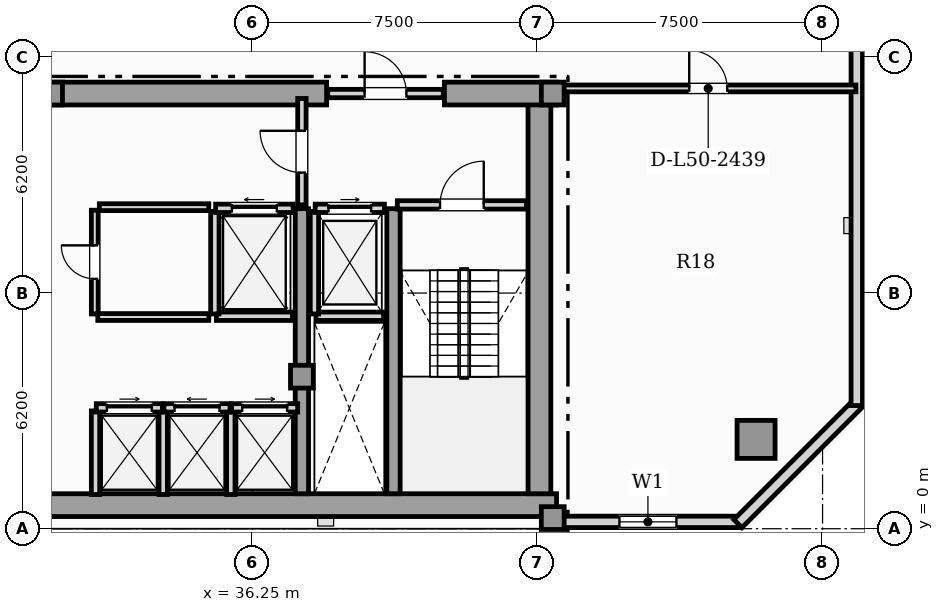
"""IFC4 building model, lengths in metres.
Left out: names, types, materials, properties, quantities, classifications, styles, units other than length and angle.
Written with IfcOpenShell. Run it as: python <this file> out.ifc"""

import sys

from ifc_helpers import new_model, si_unit, direction, frame, frame_2d, origin, origin_2d, place, context, subcontext, project, spatial, rectangle, hollow_rectangle, extrude, element, fill, save


model = new_model("IFC4")
c1 = context("Model", 3, precision=1e-05, world=origin(), true_north=direction((0.0, 1.0)))
c2 = subcontext(c1, "Body", "Model", "MODEL_VIEW")
j1 = project(units=[si_unit("LENGTHUNIT", "METRE"), si_unit("PLANEANGLEUNIT", "RADIAN")], contexts=[c1])
p1 = place(None, origin())
s1 = spatial("IfcSite", under=j1, at=p1, CompositionType="ELEMENT")
p2 = place(p1, origin())
s2 = spatial("IfcBuilding", under=s1, at=p2, CompositionType="ELEMENT")
p3 = place(p2, frame((0.0, 0.0, 204.15)))
s3 = spatial("IfcBuildingStorey", under=s2, at=p3, CompositionType="ELEMENT", Elevation=204.15)
p4 = place(p3, frame((13.25, 0.62, 0.0), z_axis=(0.0, 0.0, 1.0), x_axis=(1.0, 0.0, 0.0)))
e1 = element("IfcWall", 1, at=p4, inside=s3, PredefinedType="SHEAR", context=c2, shape_type="SweptSolid", body=[
    extrude(rectangle(XDim=31.0, YDim=0.6, at=frame_2d((15.5, 0.0))), origin(), (0.0, 0.0, 1.0), 3.63),
])
p5 = place(p3, frame((43.8, 0.92, 0.0), z_axis=(0.0, 0.0, 1.0), x_axis=(0.0, 1.0, 0.0)))
e2 = element("IfcWall", 2, at=p5, inside=s3, PredefinedType="SHEAR", context=c2, shape_type="SweptSolid", body=[
    extrude(rectangle(XDim=10.53, YDim=0.6, at=frame_2d((5.265, 0.0))), origin(), (0.0, 0.0, 1.0), 3.63),
])
p6 = place(p3, frame((30.9, 11.45, 0.0), z_axis=(0.0, 0.0, 1.0), x_axis=(1.0, 0.0, 0.0)))
e3 = element("IfcWall", 3, at=p6, inside=s3, PredefinedType="SHEAR", context=c2, shape_type="SweptSolid", body=[
    extrude(rectangle(XDim=7.3, YDim=0.6, at=frame_2d((3.65, 0.0))), origin(), (0.0, 0.0, 1.0), 3.63),
])
p7 = place(p3, frame((41.3, 11.45, 0.0), z_axis=(0.0, 0.0, 1.0), x_axis=(1.0, 0.0, 0.0)))
e4 = element("IfcWall", 4, at=p7, inside=s3, PredefinedType="SHEAR", context=c2, shape_type="SweptSolid", body=[
    extrude(rectangle(XDim=2.95, YDim=0.6, at=frame_2d((1.475, 0.0))), origin(), (0.0, 0.0, 1.0), 3.63),
])
for number, where, z_axis, x_axis in (
    (5, (37.55, 0.92, 0.0), (0.0, 0.0, 1.0), (0.0, 1.0, 0.0)),
    (6, (39.96, 0.92, 0.0), (0.0, 0.0, 1.0), (0.0, 1.0, 0.0)),
):
    element("IfcWall", number, at=place(p3, frame(where, z_axis=z_axis, x_axis=x_axis)), inside=s3, PredefinedType="SHEAR", context=c2, shape_type="SweptSolid", body=[
        extrude(rectangle(XDim=7.5, YDim=0.35, at=frame_2d((3.75, 0.0))), origin(), (0.0, 0.0, 1.0), 3.63),
    ])
for number, where, z_axis, x_axis in (
    (7, (44.15, 0.28, 0.0), (0.0, 0.0, 1.0), (1.0, 0.0, 0.0)),
    (8, (44.15, 11.45, 0.0), (0.0, 0.0, 1.0), (1.0, 0.0, 0.0)),
    (9, (37.55, 4.0, 0.0), (0.0, 0.0, 1.0), (1.0, 0.0, 0.0)),
    (10, (30.95, 11.45, 0.0), (0.0, 0.0, 1.0), (1.0, 0.0, 0.0)),
):
    element("IfcColumn", number, at=place(p3, frame(where, z_axis=z_axis, x_axis=x_axis)), inside=s3, PredefinedType="COLUMN", context=c2, shape_type="SweptSolid", body=[
        extrude(rectangle(XDim=0.6, YDim=0.6, at=origin_2d()), origin(), (0.0, 0.0, 1.0), 3.85),
    ])
p8 = place(p3, frame((49.5, 2.35, 0.0), z_axis=(0.0, 0.0, 1.0), x_axis=(1.0, 0.0, 0.0)))
e11 = element("IfcColumn", 11, at=p8, inside=s3, PredefinedType="USERDEFINED", context=c2, shape_type="SweptSolid", body=[
    extrude(hollow_rectangle(XDim=1.0, YDim=1.0, WallThickness=0.06, at=origin_2d()), origin(), (0.0, 0.0, 1.0), 3.85),
])
p9 = place(p3, frame((44.25, 0.18, 0.0), z_axis=(0.0, 0.0, 1.0), x_axis=(1.0, 0.0, 0.0)))
e12 = element("IfcWall", 12, at=p9, inside=s3, PredefinedType="SOLIDWALL", context=c2, shape_type="SweptSolid", body=[
    extrude(rectangle(XDim=4.81, YDim=0.3, at=frame_2d((2.405, 0.0))), origin(), (0.0, 0.0, 1.0), 3.63),
])
p10 = place(p9, frame((1.655, 0.0, 0.9)))
e13 = element("IfcOpeningElement", 13, at=p10, cuts=e12, PredefinedType="OPENING", context=c2, shape_type="SweptSolid", body=[
    extrude(rectangle(XDim=1.5, YDim=1.95, at=frame_2d((0.75, 0.975))), frame((0.0, 0.16, 0.0), z_axis=(0.0, -1.0, 0.0), x_axis=(1.0, 0.0, 0.0)), (0.0, 0.0, 1.0), 0.32),
])
p11 = place(p3, frame((49.022, 0.135, 0.0), z_axis=(0.0, 0.0, 1.0), x_axis=(0.707106781187, 0.707106781187, 0.0)))
e14 = element("IfcWall", 14, at=p11, inside=s3, PredefinedType="SOLIDWALL", context=c2, shape_type="SweptSolid", body=[
    extrude(rectangle(XDim=4.445, YDim=0.3, at=frame_2d((2.223, 0.0))), origin(), (0.0, 0.0, 1.0), 3.63),
])
p12 = place(p3, frame((52.15, 3.24, 0.0), z_axis=(0.0, 0.0, 1.0), x_axis=(0.0, 1.0, 0.0)))
e15 = element("IfcWall", 15, at=p12, inside=s3, PredefinedType="SOLIDWALL", context=c2, shape_type="SweptSolid", body=[
    extrude(rectangle(XDim=33.92, YDim=0.3, at=frame_2d((16.96, 0.0))), origin(), (0.0, 0.0, 1.0), 3.63),
])
p13 = place(p12, frame((30.56, 0.0, 0.95)))
e16 = element("IfcOpeningElement", 16, at=p13, cuts=e15, PredefinedType="OPENING", context=c2, shape_type="SweptSolid", body=[
    extrude(rectangle(XDim=0.9, YDim=1.5, at=frame_2d((0.45, 0.75))), frame((0.0, 0.16, 0.0), z_axis=(0.0, -1.0, 0.0), x_axis=(1.0, 0.0, 0.0)), (0.0, 0.0, 1.0), 0.32),
])
p14 = place(p12, frame((10.277, 0.0, 0.95)))
e17 = element("IfcOpeningElement", 17, at=p14, cuts=e15, PredefinedType="OPENING", context=c2, shape_type="SweptSolid", body=[
    extrude(rectangle(XDim=0.9, YDim=1.5, at=frame_2d((0.45, 0.75))), frame((0.0, 0.16, 0.0), z_axis=(0.0, -1.0, 0.0), x_axis=(1.0, 0.0, 0.0)), (0.0, 0.0, 1.0), 0.32),
])
p15 = place(p12, frame((12.971, 0.0, 0.9)))
e18 = element("IfcOpeningElement", 18, at=p15, cuts=e15, PredefinedType="OPENING", context=c2, shape_type="SweptSolid", body=[
    extrude(rectangle(XDim=1.5, YDim=1.95, at=frame_2d((0.75, 0.975))), frame((0.0, 0.16, 0.0), z_axis=(0.0, -1.0, 0.0), x_axis=(1.0, 0.0, 0.0)), (0.0, 0.0, 1.0), 0.32),
])
p16 = place(p12, frame((18.028, 0.0, 0.9)))
e19 = element("IfcOpeningElement", 19, at=p16, cuts=e15, PredefinedType="OPENING", context=c2, shape_type="SweptSolid", body=[
    extrude(rectangle(XDim=1.5, YDim=1.95, at=frame_2d((0.75, 0.975))), frame((0.0, 0.16, 0.0), z_axis=(0.0, -1.0, 0.0), x_axis=(1.0, 0.0, 0.0)), (0.0, 0.0, 1.0), 0.32),
])
p17 = place(p12, frame((25.274, 0.0, 0.9)))
e20 = element("IfcOpeningElement", 20, at=p17, cuts=e15, PredefinedType="OPENING", context=c2, shape_type="SweptSolid", body=[
    extrude(rectangle(XDim=1.5, YDim=1.95, at=frame_2d((0.75, 0.975))), frame((0.0, 0.16, 0.0), z_axis=(0.0, -1.0, 0.0), x_axis=(1.0, 0.0, 0.0)), (0.0, 0.0, 1.0), 0.32),
])
p18 = place(p12, frame((32.24, 0.0, 0.95)))
e21 = element("IfcOpeningElement", 21, at=p18, cuts=e15, PredefinedType="OPENING", context=c2, shape_type="SweptSolid", body=[
    extrude(rectangle(XDim=0.9, YDim=1.5, at=frame_2d((0.45, 0.75))), frame((0.0, 0.16, 0.0), z_axis=(0.0, -1.0, 0.0), x_axis=(1.0, 0.0, 0.0)), (0.0, 0.0, 1.0), 0.32),
])
p19 = place(p3, frame((37.92, 5.59, 0.0), z_axis=(0.0, 0.0, 1.0), x_axis=(1.0, 0.0, 0.0)))
e22 = element("IfcWall", 22, at=p19, inside=s3, PredefinedType="SOLIDWALL", context=c2, shape_type="SweptSolid", body=[
    extrude(rectangle(XDim=1.78, YDim=0.22, at=frame_2d((0.89, 0.0))), origin(), (0.0, 0.0, 1.0), 3.63),
])
p20 = place(p3, frame((37.88, 5.65, 0.0), z_axis=(0.0, 0.0, 1.0), x_axis=(0.0, 1.0, 0.0)))
e23 = element("IfcWall", 23, at=p20, inside=s3, PredefinedType="SOLIDWALL", context=c2, shape_type="SweptSolid", body=[
    extrude(rectangle(XDim=2.7, YDim=0.22, at=frame_2d((1.35, 0.0))), origin(), (0.0, 0.0, 1.0), 3.63),
])
p21 = place(p3, frame((37.9, 8.43, 0.0), z_axis=(0.0, 0.0, 1.0), x_axis=(1.0, 0.0, 0.0)))
e24 = element("IfcWall", 24, at=p21, inside=s3, PredefinedType="SOLIDWALL", context=c2, shape_type="SweptSolid", body=[
    extrude(rectangle(XDim=1.82, YDim=0.22, at=frame_2d((0.91, 0.0))), origin(), (0.0, 0.0, 1.0), 3.63),
])
p22 = place(p21, frame((0.35, 0.0, 0.0)))
e25 = element("IfcOpeningElement", 25, at=p22, cuts=e24, PredefinedType="OPENING", context=c2, shape_type="SweptSolid", body=[
    extrude(rectangle(XDim=1.12, YDim=2.25, at=frame_2d((0.56, 1.125))), frame((0.0, 0.12, 0.0), z_axis=(0.0, -1.0, 0.0), x_axis=(1.0, 0.0, 0.0)), (0.0, 0.0, 1.0), 0.24),
])
p23 = place(p3, frame((35.3, 5.59, 0.0), z_axis=(0.0, 0.0, 1.0), x_axis=(1.0, 0.0, 0.0)))
e26 = element("IfcWall", 26, at=p23, inside=s3, PredefinedType="SOLIDWALL", context=c2, shape_type="SweptSolid", body=[
    extrude(rectangle(XDim=2.0, YDim=0.22, at=frame_2d((1.0, 0.0))), origin(), (0.0, 0.0, 1.0), 3.63),
])
p24 = place(p3, frame((35.26, 5.65, 0.0), z_axis=(0.0, 0.0, 1.0), x_axis=(0.0, 1.0, 0.0)))
e27 = element("IfcWall", 27, at=p24, inside=s3, PredefinedType="SOLIDWALL", context=c2, shape_type="SweptSolid", body=[
    extrude(rectangle(XDim=2.7, YDim=0.22, at=frame_2d((1.35, 0.0))), origin(), (0.0, 0.0, 1.0), 3.63),
])
p25 = place(p3, frame((35.28, 8.43, 0.0), z_axis=(0.0, 0.0, 1.0), x_axis=(1.0, 0.0, 0.0)))
e28 = element("IfcWall", 28, at=p25, inside=s3, PredefinedType="SOLIDWALL", context=c2, shape_type="SweptSolid", body=[
    extrude(rectangle(XDim=2.04, YDim=0.22, at=frame_2d((1.02, 0.0))), origin(), (0.0, 0.0, 1.0), 3.63),
])
p26 = place(p25, frame((0.43, 0.0, 0.0)))
e29 = element("IfcOpeningElement", 29, at=p26, cuts=e28, PredefinedType="OPENING", context=c2, shape_type="SweptSolid", body=[
    extrude(rectangle(XDim=1.18, YDim=2.2, at=frame_2d((0.59, 1.1))), frame((0.0, 0.12, 0.0), z_axis=(0.0, -1.0, 0.0), x_axis=(1.0, 0.0, 0.0)), (0.0, 0.0, 1.0), 0.24),
])
for number, where, z_axis, x_axis in (
    (30, (32.12, 0.9, 0.0), (0.0, 0.0, 1.0), (0.0, 1.0, 0.0)),
    (31, (33.9, 0.9, 0.0), (0.0, 0.0, 1.0), (0.0, 1.0, 0.0)),
):
    element("IfcWall", number, at=place(p3, frame(where, z_axis=z_axis, x_axis=x_axis)), inside=s3, PredefinedType="SOLIDWALL", context=c2, shape_type="SweptSolid", body=[
        extrude(rectangle(XDim=2.2, YDim=0.22, at=frame_2d((1.1, 0.0))), origin(), (0.0, 0.0, 1.0), 3.63),
    ])
p27 = place(p3, frame((32.14, 3.18, 0.0), z_axis=(0.0, 0.0, 1.0), x_axis=(1.0, 0.0, 0.0)))
e32 = element("IfcWall", 32, at=p27, inside=s3, PredefinedType="SOLIDWALL", context=c2, shape_type="SweptSolid", body=[
    extrude(rectangle(XDim=1.74, YDim=0.22, at=frame_2d((0.87, 0.0))), origin(), (0.0, 0.0, 1.0), 3.63),
])
p28 = place(p27, frame((0.28, 0.0, 0.0)))
e33 = element("IfcOpeningElement", 33, at=p28, cuts=e32, PredefinedType="OPENING", context=c2, shape_type="SweptSolid", body=[
    extrude(rectangle(XDim=1.18, YDim=2.2, at=frame_2d((0.59, 1.1))), frame((0.0, 0.12, 0.0), z_axis=(0.0, -1.0, 0.0), x_axis=(1.0, 0.0, 0.0)), (0.0, 0.0, 1.0), 0.24),
])
p29 = place(p3, frame((35.68, 0.9, 0.0), z_axis=(0.0, 0.0, 1.0), x_axis=(0.0, 1.0, 0.0)))
e34 = element("IfcWall", 34, at=p29, inside=s3, PredefinedType="SOLIDWALL", context=c2, shape_type="SweptSolid", body=[
    extrude(rectangle(XDim=2.2, YDim=0.22, at=frame_2d((1.1, 0.0))), origin(), (0.0, 0.0, 1.0), 3.63),
])
p30 = place(p3, frame((33.92, 3.18, 0.0), z_axis=(0.0, 0.0, 1.0), x_axis=(1.0, 0.0, 0.0)))
e35 = element("IfcWall", 35, at=p30, inside=s3, PredefinedType="SOLIDWALL", context=c2, shape_type="SweptSolid", body=[
    extrude(rectangle(XDim=1.74, YDim=0.22, at=frame_2d((0.87, 0.0))), origin(), (0.0, 0.0, 1.0), 3.63),
])
p31 = place(p30, frame((0.28, 0.0, 0.0)))
e36 = element("IfcOpeningElement", 36, at=p31, cuts=e35, PredefinedType="OPENING", context=c2, shape_type="SweptSolid", body=[
    extrude(rectangle(XDim=1.18, YDim=2.2, at=frame_2d((0.59, 1.1))), frame((0.0, 0.12, 0.0), z_axis=(0.0, -1.0, 0.0), x_axis=(1.0, 0.0, 0.0)), (0.0, 0.0, 1.0), 0.24),
])
p32 = place(p3, frame((35.7, 3.18, 0.0), z_axis=(0.0, 0.0, 1.0), x_axis=(1.0, 0.0, 0.0)))
e37 = element("IfcWall", 37, at=p32, inside=s3, PredefinedType="SOLIDWALL", context=c2, shape_type="SweptSolid", body=[
    extrude(rectangle(XDim=1.74, YDim=0.22, at=frame_2d((0.87, 0.0))), origin(), (0.0, 0.0, 1.0), 3.63),
])
p33 = place(p32, frame((0.28, 0.0, 0.0)))
e38 = element("IfcOpeningElement", 38, at=p33, cuts=e37, PredefinedType="OPENING", context=c2, shape_type="SweptSolid", body=[
    extrude(rectangle(XDim=1.18, YDim=2.2, at=frame_2d((0.59, 1.1))), frame((0.0, 0.12, 0.0), z_axis=(0.0, -1.0, 0.0), x_axis=(1.0, 0.0, 0.0)), (0.0, 0.0, 1.0), 0.24),
])
p34 = place(p3, frame((40.06, 8.52, 0.0), z_axis=(0.0, 0.0, 1.0), x_axis=(1.0, 0.0, 0.0)))
e39 = element("IfcWall", 39, at=p34, inside=s3, PredefinedType="SOLIDWALL", context=c2, shape_type="SweptSolid", body=[
    extrude(rectangle(XDim=3.4, YDim=0.22, at=frame_2d((1.7, 0.0))), origin(), (0.0, 0.0, 1.0), 3.63),
])
p35 = place(p34, frame((1.125, 0.0, 0.0)))
e40 = element("IfcOpeningElement", 40, at=p35, cuts=e39, PredefinedType="OPENING", context=c2, shape_type="SweptSolid", body=[
    extrude(rectangle(XDim=1.15, YDim=2.2, at=frame_2d((0.575, 1.1))), frame((0.0, 0.12, 0.0), z_axis=(0.0, -1.0, 0.0), x_axis=(1.0, 0.0, 0.0)), (0.0, 0.0, 1.0), 0.24),
])
p36 = place(p3, frame((37.55, 8.52, 0.0), z_axis=(0.0, 0.0, 1.0), x_axis=(0.0, 1.0, 0.0)))
e41 = element("IfcWall", 41, at=p36, inside=s3, PredefinedType="SOLIDWALL", context=c2, shape_type="SweptSolid", body=[
    extrude(rectangle(XDim=2.8, YDim=0.22, at=frame_2d((1.4, 0.0))), origin(), (0.0, 0.0, 1.0), 3.086),
])
p37 = place(p36, frame((0.85, 0.0, 0.0)))
e42 = element("IfcOpeningElement", 42, at=p37, cuts=e41, PredefinedType="OPENING", context=c2, shape_type="SweptSolid", body=[
    extrude(rectangle(XDim=1.1, YDim=2.2, at=frame_2d((0.55, 1.1))), frame((0.0, 0.12, 0.0), z_axis=(0.0, -1.0, 0.0), x_axis=(1.0, 0.0, 0.0)), (0.0, 0.0, 1.0), 0.24),
])
p38 = place(p3, frame((38.23, 11.45, 0.0), z_axis=(0.0, 0.0, 1.0), x_axis=(1.0, 0.0, 0.0)))
e43 = element("IfcWall", 43, at=p38, inside=s3, PredefinedType="SOLIDWALL", context=c2, shape_type="SweptSolid", body=[
    extrude(rectangle(XDim=3.04, YDim=0.22, at=frame_2d((1.52, 0.0))), origin(), (0.0, 0.0, 1.0), 3.63),
])
p39 = place(p38, frame((0.97, 0.0, 0.0)))
e44 = element("IfcOpeningElement", 44, at=p39, cuts=e43, PredefinedType="OPENING", context=c2, shape_type="SweptSolid", body=[
    extrude(rectangle(XDim=1.1, YDim=2.2, at=frame_2d((0.55, 1.1))), frame((0.0, 0.12, 0.0), z_axis=(0.0, -1.0, 0.0), x_axis=(1.0, 0.0, 0.0)), (0.0, 0.0, 1.0), 0.24),
])
p40 = place(p3, frame((32.1, 5.65, 0.0), z_axis=(0.0, 0.0, 1.0), x_axis=(0.0, 1.0, 0.0)))
e45 = element("IfcWall", 45, at=p40, inside=s3, PredefinedType="PARTITIONING", context=c2, shape_type="SweptSolid", body=[
    extrude(rectangle(XDim=2.73, YDim=0.18, at=frame_2d((1.365, 0.0))), origin(), (0.0, 0.0, 1.0), 3.63),
])
p41 = place(p40, frame((0.925, 0.0, 0.0)))
e46 = element("IfcOpeningElement", 46, at=p41, cuts=e45, PredefinedType="OPENING", context=c2, shape_type="SweptSolid", body=[
    extrude(rectangle(XDim=0.88, YDim=2.05, at=frame_2d((0.44, 1.025))), frame((0.0, 0.1, 0.0), z_axis=(0.0, -1.0, 0.0), x_axis=(1.0, 0.0, 0.0)), (0.0, 0.0, 1.0), 0.2),
])
p42 = place(p3, frame((32.22, 8.46, 0.0), z_axis=(0.0, 0.0, 1.0), x_axis=(1.0, 0.0, 0.0)))
e47 = element("IfcWall", 47, at=p42, inside=s3, PredefinedType="PARTITIONING", context=c2, shape_type="SweptSolid", body=[
    extrude(rectangle(XDim=2.88, YDim=0.18, at=frame_2d((1.44, 0.0))), origin(), (0.0, 0.0, 1.0), 3.63),
])
p43 = place(p3, frame((32.18, 5.57, 0.0), z_axis=(0.0, 0.0, 1.0), x_axis=(1.0, 0.0, 0.0)))
e48 = element("IfcWall", 48, at=p43, inside=s3, PredefinedType="PARTITIONING", context=c2, shape_type="SweptSolid", body=[
    extrude(rectangle(XDim=2.92, YDim=0.18, at=frame_2d((1.46, 0.0))), origin(), (0.0, 0.0, 1.0), 3.63),
])
p44 = place(p3, frame((44.355, 11.585, 0.0), z_axis=(0.0, 0.0, 1.0), x_axis=(1.0, 0.0, 0.0)))
e49 = element("IfcWall", 49, at=p44, inside=s3, PredefinedType="PARTITIONING", context=c2, shape_type="SweptSolid", body=[
    extrude(rectangle(XDim=7.772, YDim=0.18, at=frame_2d((3.886, 0.0))), origin(), (0.0, 0.0, 1.0), 3.63),
])
p45 = place(p44, frame((3.386, 0.0, 0.0)))
e50 = element("IfcOpeningElement", 50, at=p45, cuts=e49, PredefinedType="OPENING", context=c2, shape_type="SweptSolid", body=[
    extrude(rectangle(XDim=1.0, YDim=2.15, at=frame_2d((0.5, 1.075))), frame((0.0, 0.1, 0.0), z_axis=(0.0, -1.0, 0.0), x_axis=(1.0, 0.0, 0.0)), (0.0, 0.0, 1.0), 0.2),
])
p46 = place(p10, origin())
e51 = element("IfcWindow", 51, at=p46, inside=s3, PartitioningType="SINGLE_PANEL", PredefinedType="WINDOW", context=c2, shape_type="SweptSolid", body=[
    extrude(rectangle(XDim=1.5, YDim=1.95, at=frame_2d((0.75, 0.975))), frame((0.0, 0.03, 0.0), z_axis=(0.0, -1.0, 0.0), x_axis=(1.0, 0.0, 0.0)), (0.0, 0.0, 1.0), 0.06),
])
fill(e13, e51)
p47 = place(p22, origin())
e52 = element("IfcDoor", 52, at=p47, inside=s3, OperationType="SLIDING_TO_RIGHT", PredefinedType="DOOR", context=c2, shape_type="SweptSolid", body=[
    extrude(rectangle(XDim=1.12, YDim=2.25, at=frame_2d((0.56, 1.125))), frame((0.0, 0.025, 0.0), z_axis=(0.0, -1.0, 0.0), x_axis=(1.0, 0.0, 0.0)), (0.0, 0.0, 1.0), 0.05),
])
fill(e25, e52)
p48 = place(p26, origin())
e53 = element("IfcDoor", 53, at=p48, inside=s3, OperationType="SLIDING_TO_LEFT", PredefinedType="DOOR", context=c2, shape_type="SweptSolid", body=[
    extrude(rectangle(XDim=1.18, YDim=2.2, at=frame_2d((0.59, 1.1))), frame((0.0, 0.025, 0.0), z_axis=(0.0, -1.0, 0.0), x_axis=(1.0, 0.0, 0.0)), (0.0, 0.0, 1.0), 0.05),
])
fill(e29, e53)
p49 = place(p28, origin())
e54 = element("IfcDoor", 54, at=p49, inside=s3, OperationType="SLIDING_TO_RIGHT", PredefinedType="DOOR", context=c2, shape_type="SweptSolid", body=[
    extrude(rectangle(XDim=1.18, YDim=2.2, at=frame_2d((0.59, 1.1))), frame((0.0, 0.025, 0.0), z_axis=(0.0, -1.0, 0.0), x_axis=(1.0, 0.0, 0.0)), (0.0, 0.0, 1.0), 0.05),
])
fill(e33, e54)
p50 = place(p31, origin())
e55 = element("IfcDoor", 55, at=p50, inside=s3, OperationType="SLIDING_TO_LEFT", PredefinedType="DOOR", context=c2, shape_type="SweptSolid", body=[
    extrude(rectangle(XDim=1.18, YDim=2.2, at=frame_2d((0.59, 1.1))), frame((0.0, 0.025, 0.0), z_axis=(0.0, -1.0, 0.0), x_axis=(1.0, 0.0, 0.0)), (0.0, 0.0, 1.0), 0.05),
])
fill(e36, e55)
p51 = place(p33, origin())
e56 = element("IfcDoor", 56, at=p51, inside=s3, OperationType="SLIDING_TO_RIGHT", PredefinedType="DOOR", context=c2, shape_type="SweptSolid", body=[
    extrude(rectangle(XDim=1.18, YDim=2.2, at=frame_2d((0.59, 1.1))), frame((0.0, 0.025, 0.0), z_axis=(0.0, -1.0, 0.0), x_axis=(1.0, 0.0, 0.0)), (0.0, 0.0, 1.0), 0.05),
])
fill(e38, e56)
p52 = place(p35, origin())
e57 = element("IfcDoor", 57, at=p52, inside=s3, OperationType="SINGLE_SWING_RIGHT", PredefinedType="DOOR", context=c2, shape_type="SweptSolid", body=[
    extrude(rectangle(XDim=1.15, YDim=2.2, at=frame_2d((0.575, 1.1))), frame((0.0, 0.025, 0.0), z_axis=(0.0, -1.0, 0.0), x_axis=(1.0, 0.0, 0.0)), (0.0, 0.0, 1.0), 0.05),
])
fill(e40, e57)
p53 = place(p37, origin())
e58 = element("IfcDoor", 58, at=p53, inside=s3, OperationType="SINGLE_SWING_RIGHT", PredefinedType="DOOR", context=c2, shape_type="SweptSolid", body=[
    extrude(rectangle(XDim=1.1, YDim=2.2, at=frame_2d((0.55, 1.1))), frame((0.0, 0.025, 0.0), z_axis=(0.0, -1.0, 0.0), x_axis=(1.0, 0.0, 0.0)), (0.0, 0.0, 1.0), 0.05),
])
fill(e42, e58)
p54 = place(p39, origin())
e59 = element("IfcDoor", 59, at=p54, inside=s3, OperationType="SINGLE_SWING_LEFT", PredefinedType="DOOR", context=c2, shape_type="SweptSolid", body=[
    extrude(rectangle(XDim=1.1, YDim=2.2, at=frame_2d((0.55, 1.1))), frame((0.0, 0.025, 0.0), z_axis=(0.0, -1.0, 0.0), x_axis=(1.0, 0.0, 0.0)), (0.0, 0.0, 1.0), 0.05),
])
fill(e44, e59)
p55 = place(p41, origin())
e60 = element("IfcDoor", 60, at=p55, inside=s3, OperationType="SINGLE_SWING_RIGHT", PredefinedType="DOOR", context=c2, shape_type="SweptSolid", body=[
    extrude(rectangle(XDim=0.88, YDim=2.05, at=frame_2d((0.44, 1.025))), frame((0.0, 0.025, 0.0), z_axis=(0.0, -1.0, 0.0), x_axis=(1.0, 0.0, 0.0)), (0.0, 0.0, 1.0), 0.05),
])
fill(e46, e60)
p56 = place(p45, origin())
e61 = element("IfcDoor", 61, at=p56, inside=s3, OperationType="SINGLE_SWING_LEFT", PredefinedType="DOOR", context=c2, shape_type="SweptSolid", body=[
    extrude(rectangle(XDim=1.0, YDim=2.15, at=frame_2d((0.5, 1.075))), frame((0.0, 0.025, 0.0), z_axis=(0.0, -1.0, 0.0), x_axis=(1.0, 0.0, 0.0)), (0.0, 0.0, 1.0), 0.05),
])
fill(e50, e61)
save(model, sys.argv[1])
